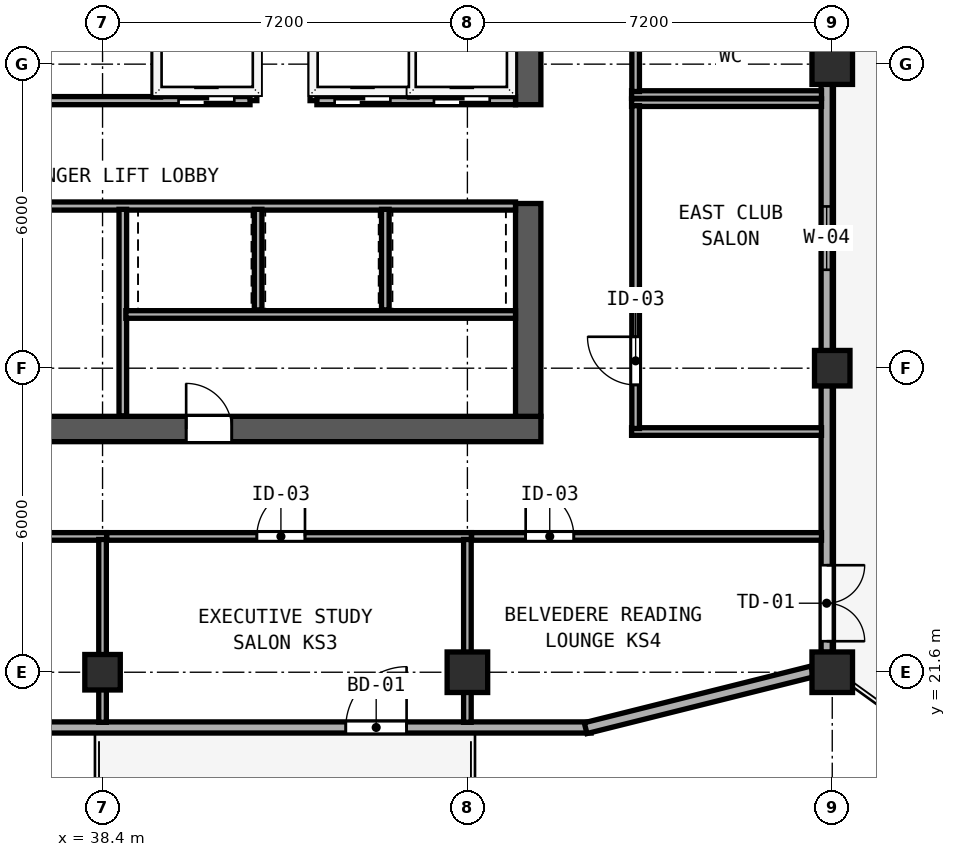
"""IFC4 building model, lengths in metres.
Left out: names, types, materials, properties, quantities, classifications, styles, units other than length and angle.
Written with IfcOpenShell. Run it as: python <this file> out.ifc"""

import sys

from ifc_helpers import new_model, si_unit, direction, frame, frame_2d, origin, origin_2d, place, context, subcontext, project, spatial, rectangle, hollow_rectangle, extrude, element, fill, save


model = new_model("IFC4")
c1 = context("Model", 3, precision=1e-05, world=origin(), true_north=direction((0.0, 1.0)))
c2 = subcontext(c1, "Body", "Model", "MODEL_VIEW")
j1 = project(units=[si_unit("LENGTHUNIT", "METRE"), si_unit("PLANEANGLEUNIT", "RADIAN")], contexts=[c1])
p1 = place(None, origin())
s1 = spatial("IfcSite", under=j1, at=p1, CompositionType="ELEMENT")
p2 = place(p1, origin())
s2 = spatial("IfcBuilding", under=s1, at=p2, CompositionType="ELEMENT")
p3 = place(p2, frame((0.0, 0.0, 235.2)))
s3 = spatial("IfcBuildingStorey", under=s2, at=p3, CompositionType="ELEMENT", Elevation=235.2)
p4 = place(p3, frame((29.75, 26.4, 0.0), z_axis=(0.0, 0.0, 1.0), x_axis=(1.0, 0.0, 0.0)))
e1 = element("IfcWall", 1, at=p4, inside=s3, PredefinedType="SHEAR", context=c2, shape_type="SweptSolid", body=[
    extrude(rectangle(XDim=17.3, YDim=0.5, at=frame_2d((8.65, 0.0))), origin(), (0.0, 0.0, 1.0), 3.67),
])
p5 = place(p4, frame((11.2, 0.0, 0.0), z_axis=(0.0, 0.0, 1.0), x_axis=(-1.0, 0.0, 0.0)))
e2 = element("IfcOpeningElement", 2, at=p5, cuts=e1, PredefinedType="OPENING", context=c2, shape_type="SweptSolid", body=[
    extrude(rectangle(XDim=0.9, YDim=2.1, at=frame_2d((0.45, 1.05))), frame((0.0, 0.26, 0.0), z_axis=(0.0, -1.0, 0.0), x_axis=(1.0, 0.0, 0.0)), (0.0, 0.0, 1.0), 0.52),
])
p6 = place(p3, frame((46.8, 26.65, 0.0), z_axis=(0.0, 0.0, 1.0), x_axis=(0.0, 1.0, 0.0)))
e3 = element("IfcWall", 3, at=p6, inside=s3, PredefinedType="SHEAR", context=c2, shape_type="SweptSolid", body=[
    extrude(rectangle(XDim=4.2, YDim=0.5, at=frame_2d((2.1, 0.0))), origin(), (0.0, 0.0, 1.0), 3.67),
])
p7 = place(p3, frame((46.8, 32.8, 0.0), z_axis=(0.0, 0.0, 1.0), x_axis=(0.0, 1.0, 0.0)))
e4 = element("IfcWall", 4, at=p7, inside=s3, PredefinedType="SHEAR", context=c2, shape_type="SweptSolid", body=[
    extrude(rectangle(XDim=10.15, YDim=0.5, at=frame_2d((5.075, 0.0))), origin(), (0.0, 0.0, 1.0), 3.67),
])
for number, where, z_axis, x_axis in (
    (5, (52.8, 21.6, 0.0), (0.0, 0.0, 1.0), (1.0, 0.0, 0.0)),
    (6, (52.8, 33.6, 0.0), (0.0, 0.0, 1.0), (1.0, 0.0, 0.0)),
    (7, (45.6, 21.6, 0.0), (0.0, 0.0, 1.0), (1.0, 0.0, 0.0)),
):
    element("IfcColumn", number, at=place(p3, frame(where, z_axis=z_axis, x_axis=x_axis)), inside=s3, PredefinedType="COLUMN", context=c2, shape_type="SweptSolid", body=[
        extrude(hollow_rectangle(XDim=0.8, YDim=0.8, WallThickness=0.03, at=origin_2d()), origin(), (0.0, 0.0, 1.0), 3.85),
    ])
for number, where, z_axis, x_axis in (
    (8, (52.8, 27.6, 0.0), (0.0, 0.0, 1.0), (1.0, 0.0, 0.0)),
    (9, (38.4, 21.6, 0.0), (0.0, 0.0, 1.0), (1.0, 0.0, 0.0)),
):
    element("IfcColumn", number, at=place(p3, frame(where, z_axis=z_axis, x_axis=x_axis)), inside=s3, PredefinedType="COLUMN", context=c2, shape_type="SweptSolid", body=[
        extrude(hollow_rectangle(XDim=0.7, YDim=0.7, WallThickness=0.026, at=origin_2d()), origin(), (0.0, 0.0, 1.0), 3.85),
    ])
p8 = place(p3, frame((28.759, 20.51, 0.0), z_axis=(0.0, 0.0, 1.0), x_axis=(1.0, 0.0, 0.0)))
e10 = element("IfcWall", 10, at=p8, inside=s3, PredefinedType="SOLIDWALL", context=c2, shape_type="SweptSolid", body=[
    extrude(rectangle(XDim=19.283, YDim=0.22, at=frame_2d((9.642, 0.0))), origin(), (0.0, 0.0, 1.0), 3.67),
])
p9 = place(p8, frame((15.641, 0.0, 0.0), z_axis=(0.0, 0.0, 1.0), x_axis=(-1.0, 0.0, 0.0)))
e11 = element("IfcOpeningElement", 11, at=p9, cuts=e10, PredefinedType="OPENING", context=c2, shape_type="SweptSolid", body=[
    extrude(rectangle(XDim=1.2, YDim=2.15, at=frame_2d((0.6, 1.075))), frame((0.0, 0.12, 0.0), z_axis=(0.0, -1.0, 0.0), x_axis=(1.0, 0.0, 0.0)), (0.0, 0.0, 1.0), 0.24),
])
p10 = place(p3, frame((47.933, 20.497, 0.0), z_axis=(0.0, 0.0, 1.0), x_axis=(0.970133159038, 0.242572986408, 0.0)))
e12 = element("IfcWall", 12, at=p10, inside=s3, PredefinedType="SOLIDWALL", context=c2, shape_type="SweptSolid", body=[
    extrude(rectangle(XDim=4.613, YDim=0.22, at=frame_2d((2.306, 0.0))), origin(), (0.0, 0.0, 1.0), 3.315),
])
p11 = place(p3, frame((52.69, 21.992, 0.0), z_axis=(0.0, 0.0, 1.0), x_axis=(0.0, 1.0, 0.0)))
e13 = element("IfcWall", 13, at=p11, inside=s3, PredefinedType="SOLIDWALL", context=c2, shape_type="SweptSolid", body=[
    extrude(rectangle(XDim=5.266, YDim=0.22, at=frame_2d((2.633, 0.0))), origin(), (0.0, 0.0, 1.0), 3.315),
])
p12 = place(p11, frame((1.72, 0.0, 0.0), z_axis=(0.0, 0.0, 1.0), x_axis=(-1.0, 0.0, 0.0)))
e14 = element("IfcOpeningElement", 14, at=p12, cuts=e13, PredefinedType="OPENING", context=c2, shape_type="SweptSolid", body=[
    extrude(rectangle(XDim=1.5, YDim=2.2, at=frame_2d((0.75, 1.1))), frame((0.0, 0.12, 0.0), z_axis=(0.0, -1.0, 0.0), x_axis=(1.0, 0.0, 0.0)), (0.0, 0.0, 1.0), 0.24),
])
p13 = place(p3, frame((52.69, 27.942, 0.0), z_axis=(0.0, 0.0, 1.0), x_axis=(0.0, 1.0, 0.0)))
e15 = element("IfcWall", 15, at=p13, inside=s3, PredefinedType="SOLIDWALL", context=c2, shape_type="SweptSolid", body=[
    extrude(rectangle(XDim=5.266, YDim=0.22, at=frame_2d((2.633, 0.0))), origin(), (0.0, 0.0, 1.0), 3.315),
])
p14 = place(p13, frame((1.6, 0.0, 0.85)))
e16 = element("IfcOpeningElement", 16, at=p14, cuts=e15, PredefinedType="OPENING", context=c2, shape_type="SweptSolid", body=[
    extrude(rectangle(XDim=1.25, YDim=1.95, at=frame_2d((0.625, 0.975))), frame((0.0, 0.12, 0.0), z_axis=(0.0, -1.0, 0.0), x_axis=(1.0, 0.0, 0.0)), (0.0, 0.0, 1.0), 0.24),
])
for number, where, z_axis, x_axis in (
    (17, (41.37, 32.88, 0.0), (0.0, 0.0, 1.0), (0.0, 1.0, 0.0)),
    (18, (42.57, 32.88, 0.0), (0.0, 0.0, 1.0), (0.0, 1.0, 0.0)),
):
    element("IfcWall", number, at=place(p3, frame(where, z_axis=z_axis, x_axis=x_axis)), inside=s3, PredefinedType="SOLIDWALL", context=c2, shape_type="SweptSolid", body=[
        extrude(rectangle(XDim=2.17, YDim=0.15, at=frame_2d((1.085, 0.0))), origin(), (0.0, 0.0, 1.0), 3.67),
    ])
p15 = place(p3, frame((35.57, 32.88, 0.0), z_axis=(0.0, 0.0, 1.0), x_axis=(1.0, 0.0, 0.0)))
e19 = element("IfcWall", 19, at=p15, inside=s3, PredefinedType="SOLIDWALL", context=c2, shape_type="SweptSolid", body=[
    extrude(rectangle(XDim=5.74, YDim=0.16, at=frame_2d((2.87, 0.0))), origin(), (0.0, 0.0, 1.0), 3.67),
])
p16 = place(p15, frame((1.49, 0.0, 0.0), z_axis=(0.0, 0.0, 1.0), x_axis=(-1.0, 0.0, 0.0)))
e20 = element("IfcOpeningElement", 20, at=p16, cuts=e19, PredefinedType="OPENING", context=c2, shape_type="SweptSolid", body=[
    extrude(rectangle(XDim=0.95, YDim=2.12, at=frame_2d((0.475, 1.06))), frame((0.0, 0.09, 0.0), z_axis=(0.0, -1.0, 0.0), x_axis=(1.0, 0.0, 0.0)), (0.0, 0.0, 1.0), 0.18),
])
p17 = place(p15, frame((5.43, 0.0, 0.0), z_axis=(0.0, 0.0, 1.0), x_axis=(-1.0, 0.0, 0.0)))
e21 = element("IfcOpeningElement", 21, at=p17, cuts=e19, PredefinedType="OPENING", context=c2, shape_type="SweptSolid", body=[
    extrude(rectangle(XDim=1.1, YDim=2.2, at=frame_2d((0.55, 1.1))), frame((0.0, 0.09, 0.0), z_axis=(0.0, -1.0, 0.0), x_axis=(1.0, 0.0, 0.0)), (0.0, 0.0, 1.0), 0.18),
])
p18 = place(p3, frame((42.63, 32.88, 0.0), z_axis=(0.0, 0.0, 1.0), x_axis=(1.0, 0.0, 0.0)))
e22 = element("IfcWall", 22, at=p18, inside=s3, PredefinedType="SOLIDWALL", context=c2, shape_type="SweptSolid", body=[
    extrude(rectangle(XDim=3.92, YDim=0.16, at=frame_2d((1.96, 0.0))), origin(), (0.0, 0.0, 1.0), 3.67),
])
p19 = place(p18, frame((1.45, 0.0, 0.0), z_axis=(0.0, 0.0, 1.0), x_axis=(-1.0, 0.0, 0.0)))
e23 = element("IfcOpeningElement", 23, at=p19, cuts=e22, PredefinedType="OPENING", context=c2, shape_type="SweptSolid", body=[
    extrude(rectangle(XDim=1.1, YDim=2.2, at=frame_2d((0.55, 1.1))), frame((0.0, 0.09, 0.0), z_axis=(0.0, -1.0, 0.0), x_axis=(1.0, 0.0, 0.0)), (0.0, 0.0, 1.0), 0.18),
])
p20 = place(p18, frame((3.41, 0.0, 0.0), z_axis=(0.0, 0.0, 1.0), x_axis=(-1.0, 0.0, 0.0)))
e24 = element("IfcOpeningElement", 24, at=p20, cuts=e22, PredefinedType="OPENING", context=c2, shape_type="SweptSolid", body=[
    extrude(rectangle(XDim=1.1, YDim=2.2, at=frame_2d((0.55, 1.1))), frame((0.0, 0.09, 0.0), z_axis=(0.0, -1.0, 0.0), x_axis=(1.0, 0.0, 0.0)), (0.0, 0.0, 1.0), 0.18),
])
for number, where, z_axis, x_axis in (
    (25, (39.47, 32.95, 0.0), (0.0, 0.0, 1.0), (0.0, 1.0, 0.0)),
    (26, (44.53, 32.95, 0.0), (0.0, 0.0, 1.0), (0.0, 1.0, 0.0)),
):
    element("IfcWall", number, at=place(p3, frame(where, z_axis=z_axis, x_axis=x_axis)), inside=s3, PredefinedType="SOLIDWALL", context=c2, shape_type="SweptSolid", body=[
        extrude(rectangle(XDim=2.05, YDim=0.15, at=frame_2d((1.025, 0.0))), origin(), (0.0, 0.0, 1.0), 3.67),
    ])
p21 = place(p3, frame((30.25, 30.8, 0.0), z_axis=(0.0, 0.0, 1.0), x_axis=(1.0, 0.0, 0.0)))
e27 = element("IfcWall", 27, at=p21, inside=s3, PredefinedType="SOLIDWALL", context=c2, shape_type="SweptSolid", body=[
    extrude(rectangle(XDim=16.3, YDim=0.16, at=frame_2d((8.15, 0.0))), origin(), (0.0, 0.0, 1.0), 3.67),
])
p22 = place(p21, frame((2.2, 0.0, 0.0)))
e28 = element("IfcOpeningElement", 28, at=p22, cuts=e27, PredefinedType="OPENING", context=c2, shape_type="SweptSolid", body=[
    extrude(rectangle(XDim=0.95, YDim=2.12, at=frame_2d((0.475, 1.06))), frame((0.0, 0.09, 0.0), z_axis=(0.0, -1.0, 0.0), x_axis=(1.0, 0.0, 0.0)), (0.0, 0.0, 1.0), 0.18),
])
p23 = place(p3, frame((38.8, 26.66, 0.0), z_axis=(0.0, 0.0, 1.0), x_axis=(0.0, 1.0, 0.0)))
e29 = element("IfcWall", 29, at=p23, inside=s3, PredefinedType="SOLIDWALL", context=c2, shape_type="SweptSolid", body=[
    extrude(rectangle(XDim=4.075, YDim=0.15, at=frame_2d((2.038, 0.0))), origin(), (0.0, 0.0, 1.0), 3.67),
])
p24 = place(p3, frame((38.86, 28.66, 0.0), z_axis=(0.0, 0.0, 1.0), x_axis=(1.0, 0.0, 0.0)))
e30 = element("IfcWall", 30, at=p24, inside=s3, PredefinedType="PARTITIONING", context=c2, shape_type="SweptSolid", body=[
    extrude(rectangle(XDim=7.69, YDim=0.15, at=frame_2d((3.845, 0.0))), origin(), (0.0, 0.0, 1.0), 3.67),
])
for number, where, z_axis, x_axis in (
    (31, (41.47, 28.75, 0.0), (0.0, 0.0, 1.0), (0.0, 1.0, 0.0)),
    (32, (43.98, 28.75, 0.0), (0.0, 0.0, 1.0), (0.0, 1.0, 0.0)),
):
    element("IfcWall", number, at=place(p3, frame(where, z_axis=z_axis, x_axis=x_axis)), inside=s3, PredefinedType="SOLIDWALL", context=c2, shape_type="SweptSolid", body=[
        extrude(rectangle(XDim=1.985, YDim=0.15, at=frame_2d((0.993, 0.0))), origin(), (0.0, 0.0, 1.0), 3.67),
    ])
p25 = place(p3, frame((48.84, 33.0, 0.0), z_axis=(0.0, 0.0, 1.0), x_axis=(1.0, 0.0, 0.0)))
e33 = element("IfcWall", 33, at=p25, inside=s3, PredefinedType="PARTITIONING", context=c2, shape_type="SweptSolid", body=[
    extrude(rectangle(XDim=3.748, YDim=0.15, at=frame_2d((1.874, 0.0))), origin(), (0.0, 0.0, 1.0), 3.67),
])
p26 = place(p3, frame((48.92, 33.06, 0.0), z_axis=(0.0, 0.0, 1.0), x_axis=(0.0, 1.0, 0.0)))
e34 = element("IfcWall", 34, at=p26, inside=s3, PredefinedType="PARTITIONING", context=c2, shape_type="SweptSolid", body=[
    extrude(rectangle(XDim=3.28, YDim=0.15, at=frame_2d((1.64, 0.0))), origin(), (0.0, 0.0, 1.0), 3.67),
])
p27 = place(p26, frame((0.86, 0.0, 0.0)))
e35 = element("IfcOpeningElement", 35, at=p27, cuts=e34, PredefinedType="OPENING", context=c2, shape_type="SweptSolid", body=[
    extrude(rectangle(XDim=0.95, YDim=2.12, at=frame_2d((0.475, 1.06))), frame((0.0, 0.085, 0.0), z_axis=(0.0, -1.0, 0.0), x_axis=(1.0, 0.0, 0.0)), (0.0, 0.0, 1.0), 0.17),
])
for number, where, z_axis, x_axis in (
    (36, (48.84, 32.84, 0.0), (0.0, 0.0, 1.0), (1.0, 0.0, 0.0)),
    (37, (48.84, 26.35, 0.0), (0.0, 0.0, 1.0), (1.0, 0.0, 0.0)),
):
    element("IfcWall", number, at=place(p3, frame(where, z_axis=z_axis, x_axis=x_axis)), inside=s3, PredefinedType="PARTITIONING", context=c2, shape_type="SweptSolid", body=[
        extrude(rectangle(XDim=3.748, YDim=0.15, at=frame_2d((1.874, 0.0))), origin(), (0.0, 0.0, 1.0), 3.67),
    ])
p28 = place(p3, frame((48.92, 26.41, 0.0), z_axis=(0.0, 0.0, 1.0), x_axis=(0.0, 1.0, 0.0)))
e38 = element("IfcWall", 38, at=p28, inside=s3, PredefinedType="PARTITIONING", context=c2, shape_type="SweptSolid", body=[
    extrude(rectangle(XDim=6.37, YDim=0.15, at=frame_2d((3.185, 0.0))), origin(), (0.0, 0.0, 1.0), 3.67),
])
p29 = place(p28, frame((0.86, 0.0, 0.0)))
e39 = element("IfcOpeningElement", 39, at=p29, cuts=e38, PredefinedType="OPENING", context=c2, shape_type="SweptSolid", body=[
    extrude(rectangle(XDim=0.95, YDim=2.12, at=frame_2d((0.475, 1.06))), frame((0.0, 0.085, 0.0), z_axis=(0.0, -1.0, 0.0), x_axis=(1.0, 0.0, 0.0)), (0.0, 0.0, 1.0), 0.17),
])
p30 = place(p3, frame((31.282, 24.28, 0.0), z_axis=(0.0, 0.0, 1.0), x_axis=(1.0, 0.0, 0.0)))
e40 = element("IfcWall", 40, at=p30, inside=s3, PredefinedType="PARTITIONING", context=c2, shape_type="SweptSolid", body=[
    extrude(rectangle(XDim=7.198, YDim=0.15, at=frame_2d((3.599, 0.0))), origin(), (0.0, 0.0, 1.0), 3.67),
])
p31 = place(p30, frame((3.913, 0.0, 0.0), z_axis=(0.0, 0.0, 1.0), x_axis=(-1.0, 0.0, 0.0)))
e41 = element("IfcOpeningElement", 41, at=p31, cuts=e40, PredefinedType="OPENING", context=c2, shape_type="SweptSolid", body=[
    extrude(rectangle(XDim=0.95, YDim=2.12, at=frame_2d((0.475, 1.06))), frame((0.0, 0.085, 0.0), z_axis=(0.0, -1.0, 0.0), x_axis=(1.0, 0.0, 0.0)), (0.0, 0.0, 1.0), 0.17),
])
p32 = place(p3, frame((38.4, 20.612, 0.0), z_axis=(0.0, 0.0, 1.0), x_axis=(0.0, 1.0, 0.0)))
e42 = element("IfcWall", 42, at=p32, inside=s3, PredefinedType="PARTITIONING", context=c2, shape_type="SweptSolid", body=[
    extrude(rectangle(XDim=3.608, YDim=0.15, at=frame_2d((1.804, 0.0))), origin(), (0.0, 0.0, 1.0), 3.155),
])
p33 = place(p3, frame((38.482, 24.28, 0.0), z_axis=(0.0, 0.0, 1.0), x_axis=(1.0, 0.0, 0.0)))
e43 = element("IfcWall", 43, at=p33, inside=s3, PredefinedType="PARTITIONING", context=c2, shape_type="SweptSolid", body=[
    extrude(rectangle(XDim=7.198, YDim=0.15, at=frame_2d((3.599, 0.0))), origin(), (0.0, 0.0, 1.0), 3.67),
])
p34 = place(p33, frame((3.913, 0.0, 0.0), z_axis=(0.0, 0.0, 1.0), x_axis=(-1.0, 0.0, 0.0)))
e44 = element("IfcOpeningElement", 44, at=p34, cuts=e43, PredefinedType="OPENING", context=c2, shape_type="SweptSolid", body=[
    extrude(rectangle(XDim=0.95, YDim=2.12, at=frame_2d((0.475, 1.06))), frame((0.0, 0.085, 0.0), z_axis=(0.0, -1.0, 0.0), x_axis=(1.0, 0.0, 0.0)), (0.0, 0.0, 1.0), 0.17),
])
p35 = place(p3, frame((45.6, 20.612, 0.0), z_axis=(0.0, 0.0, 1.0), x_axis=(0.0, 1.0, 0.0)))
e45 = element("IfcWall", 45, at=p35, inside=s3, PredefinedType="PARTITIONING", context=c2, shape_type="SweptSolid", body=[
    extrude(rectangle(XDim=3.608, YDim=0.15, at=frame_2d((1.804, 0.0))), origin(), (0.0, 0.0, 1.0), 3.155),
])
p36 = place(p3, frame((45.682, 24.28, 0.0), z_axis=(0.0, 0.0, 1.0), x_axis=(1.0, 0.0, 0.0)))
e46 = element("IfcWall", 46, at=p36, inside=s3, PredefinedType="PARTITIONING", context=c2, shape_type="SweptSolid", body=[
    extrude(rectangle(XDim=6.906, YDim=0.15, at=frame_2d((3.453, 0.0))), origin(), (0.0, 0.0, 1.0), 3.67),
])
p37 = place(p36, frame((2.018, 0.0, 0.0), z_axis=(0.0, 0.0, 1.0), x_axis=(-1.0, 0.0, 0.0)))
e47 = element("IfcOpeningElement", 47, at=p37, cuts=e46, PredefinedType="OPENING", context=c2, shape_type="SweptSolid", body=[
    extrude(rectangle(XDim=0.95, YDim=2.12, at=frame_2d((0.475, 1.06))), frame((0.0, 0.085, 0.0), z_axis=(0.0, -1.0, 0.0), x_axis=(1.0, 0.0, 0.0)), (0.0, 0.0, 1.0), 0.17),
])
p38 = place(p14, origin())
e48 = element("IfcWindow", 48, at=p38, inside=s3, PartitioningType="SINGLE_PANEL", PredefinedType="WINDOW", context=c2, shape_type="SweptSolid", body=[
    extrude(rectangle(XDim=1.25, YDim=1.95, at=frame_2d((0.625, 0.975))), frame((0.0, 0.03, 0.0), z_axis=(0.0, -1.0, 0.0), x_axis=(1.0, 0.0, 0.0)), (0.0, 0.0, 1.0), 0.06),
])
fill(e16, e48)
p39 = place(p12, origin())
e49 = element("IfcDoor", 49, at=p39, inside=s3, OperationType="DOUBLE_DOOR_SINGLE_SWING", PredefinedType="DOOR", context=c2, shape_type="SweptSolid", body=[
    extrude(rectangle(XDim=1.5, YDim=2.2, at=frame_2d((0.75, 1.1))), frame((0.0, 0.025, 0.0), z_axis=(0.0, -1.0, 0.0), x_axis=(1.0, 0.0, 0.0)), (0.0, 0.0, 1.0), 0.05),
])
fill(e14, e49)
p40 = place(p9, origin())
e50 = element("IfcDoor", 50, at=p40, inside=s3, OperationType="SINGLE_SWING_LEFT", PredefinedType="DOOR", context=c2, shape_type="SweptSolid", body=[
    extrude(rectangle(XDim=1.2, YDim=2.15, at=frame_2d((0.6, 1.075))), frame((0.0, 0.025, 0.0), z_axis=(0.0, -1.0, 0.0), x_axis=(1.0, 0.0, 0.0)), (0.0, 0.0, 1.0), 0.05),
])
fill(e11, e50)
p41 = place(p17, origin())
e51 = element("IfcDoor", 51, at=p41, inside=s3, OperationType="SLIDING_TO_RIGHT", PredefinedType="DOOR", context=c2, shape_type="SweptSolid", body=[
    extrude(rectangle(XDim=1.1, YDim=2.2, at=frame_2d((0.55, 1.1))), frame((0.0, 0.025, 0.0), z_axis=(0.0, -1.0, 0.0), x_axis=(1.0, 0.0, 0.0)), (0.0, 0.0, 1.0), 0.05),
])
fill(e21, e51)
p42 = place(p19, origin())
e52 = element("IfcDoor", 52, at=p42, inside=s3, OperationType="SLIDING_TO_RIGHT", PredefinedType="DOOR", context=c2, shape_type="SweptSolid", body=[
    extrude(rectangle(XDim=1.1, YDim=2.2, at=frame_2d((0.55, 1.1))), frame((0.0, 0.025, 0.0), z_axis=(0.0, -1.0, 0.0), x_axis=(1.0, 0.0, 0.0)), (0.0, 0.0, 1.0), 0.05),
])
fill(e23, e52)
p43 = place(p20, origin())
e53 = element("IfcDoor", 53, at=p43, inside=s3, OperationType="SLIDING_TO_RIGHT", PredefinedType="DOOR", context=c2, shape_type="SweptSolid", body=[
    extrude(rectangle(XDim=1.1, YDim=2.2, at=frame_2d((0.55, 1.1))), frame((0.0, 0.025, 0.0), z_axis=(0.0, -1.0, 0.0), x_axis=(1.0, 0.0, 0.0)), (0.0, 0.0, 1.0), 0.05),
])
fill(e24, e53)
p44 = place(p5, origin())
e54 = element("IfcDoor", 54, at=p44, inside=s3, OperationType="SINGLE_SWING_RIGHT", PredefinedType="DOOR", context=c2, shape_type="SweptSolid", body=[
    extrude(rectangle(XDim=0.9, YDim=2.1, at=frame_2d((0.45, 1.05))), frame((0.0, -0.195, 0.0), z_axis=(0.0, -1.0, 0.0), x_axis=(1.0, 0.0, 0.0)), (0.0, 0.0, 1.0), 0.05),
])
fill(e2, e54)
p45 = place(p29, origin())
e55 = element("IfcDoor", 55, at=p45, inside=s3, OperationType="SINGLE_SWING_RIGHT", PredefinedType="DOOR", context=c2, shape_type="SweptSolid", body=[
    extrude(rectangle(XDim=0.95, YDim=2.12, at=frame_2d((0.475, 1.06))), frame((0.0, 0.025, 0.0), z_axis=(0.0, -1.0, 0.0), x_axis=(1.0, 0.0, 0.0)), (0.0, 0.0, 1.0), 0.05),
])
fill(e39, e55)
p46 = place(p34, origin())
e56 = element("IfcDoor", 56, at=p46, inside=s3, OperationType="SINGLE_SWING_LEFT", PredefinedType="DOOR", context=c2, shape_type="SweptSolid", body=[
    extrude(rectangle(XDim=0.95, YDim=2.12, at=frame_2d((0.475, 1.06))), frame((0.0, 0.025, 0.0), z_axis=(0.0, -1.0, 0.0), x_axis=(1.0, 0.0, 0.0)), (0.0, 0.0, 1.0), 0.05),
])
fill(e44, e56)
p47 = place(p37, origin())
e57 = element("IfcDoor", 57, at=p47, inside=s3, OperationType="SINGLE_SWING_RIGHT", PredefinedType="DOOR", context=c2, shape_type="SweptSolid", body=[
    extrude(rectangle(XDim=0.95, YDim=2.12, at=frame_2d((0.475, 1.06))), frame((0.0, 0.025, 0.0), z_axis=(0.0, -1.0, 0.0), x_axis=(1.0, 0.0, 0.0)), (0.0, 0.0, 1.0), 0.05),
])
fill(e47, e57)
save(model, sys.argv[1])
